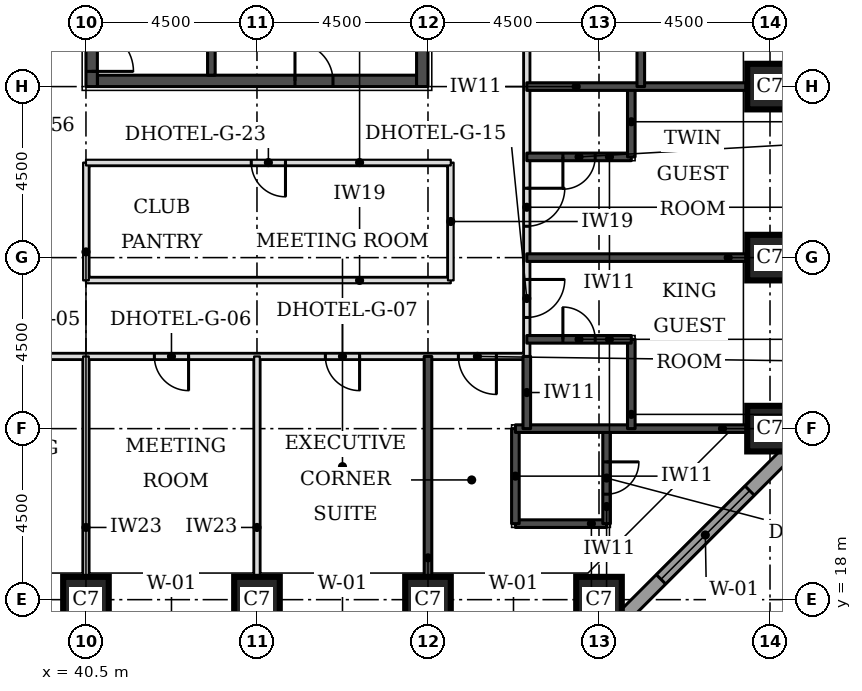
"""IFC4 building model, lengths in metres.
Left out: names, types, materials, properties, quantities, classifications, styles, units other than length and angle.
Written with IfcOpenShell. Run it as: python <this file> out.ifc"""

import sys

from ifc_helpers import new_model, si_unit, direction, frame, frame_2d, origin, origin_2d, place, context, subcontext, project, spatial, rectangle, extrude, element, fill, save


model = new_model("IFC4")
c1 = context("Model", 3, precision=1e-05, world=origin(), true_north=direction((0.0, 1.0)))
c2 = subcontext(c1, "Body", "Model", "MODEL_VIEW")
j1 = project(units=[si_unit("LENGTHUNIT", "METRE"), si_unit("PLANEANGLEUNIT", "RADIAN")], contexts=[c1])
p1 = place(None, origin())
s1 = spatial("IfcSite", under=j1, at=p1, CompositionType="ELEMENT")
p2 = place(p1, origin())
s2 = spatial("IfcBuilding", under=s1, at=p2, CompositionType="ELEMENT")
p3 = place(p2, frame((0.0, 0.0, 66.0)))
s3 = spatial("IfcBuildingStorey", under=s2, at=p3, CompositionType="ELEMENT", Elevation=66.0)
for number, where, z_axis, x_axis in (
    (1, (40.5, 18.0, 0.0), (0.0, 0.0, 1.0), (1.0, 0.0, 0.0)),
    (2, (45.0, 18.0, 0.0), (0.0, 0.0, 1.0), (1.0, 0.0, 0.0)),
    (3, (49.5, 18.0, 0.0), (0.0, 0.0, 1.0), (1.0, 0.0, 0.0)),
    (4, (54.0, 18.0, 0.0), (0.0, 0.0, 1.0), (1.0, 0.0, 0.0)),
    (5, (58.5, 22.5, 0.0), (0.0, 0.0, 1.0), (1.0, 0.0, 0.0)),
    (6, (58.5, 27.0, 0.0), (0.0, 0.0, 1.0), (1.0, 0.0, 0.0)),
    (7, (58.5, 31.5, 0.0), (0.0, 0.0, 1.0), (1.0, 0.0, 0.0)),
):
    element("IfcColumn", number, at=place(p3, frame(where, z_axis=z_axis, x_axis=x_axis)), inside=s3, PredefinedType="COLUMN", context=c2, shape_type="SweptSolid", body=[
        extrude(rectangle(XDim=1.2, YDim=1.2, at=origin_2d()), origin(), (0.0, 0.0, 1.0), 3.3),
    ])
p4 = place(p3, frame((40.8, 31.65, 0.0), z_axis=(0.0, 0.0, 1.0), x_axis=(1.0, 0.0, 0.0)))
e8 = element("IfcWall", 8, at=p4, inside=s3, PredefinedType="SHEAR", context=c2, shape_type="SweptSolid", body=[
    extrude(rectangle(XDim=8.4, YDim=0.3, at=frame_2d((4.2, 0.0))), origin(), (0.0, 0.0, 1.0), 3.3),
])
p5 = place(p4, frame((5.2, 0.0, 0.0)))
e9 = element("IfcOpeningElement", 9, at=p5, cuts=e8, PredefinedType="OPENING", context=c2, shape_type="SweptSolid", body=[
    extrude(rectangle(XDim=1.0, YDim=2.1, at=frame_2d((0.5, 1.05))), frame((0.0, 0.16, 0.0), z_axis=(0.0, -1.0, 0.0), x_axis=(1.0, 0.0, 0.0)), (0.0, 0.0, 1.0), 0.32),
])
p6 = place(p3, frame((40.65, 31.5, 0.0), z_axis=(0.0, 0.0, 1.0), x_axis=(0.0, 1.0, 0.0)))
e10 = element("IfcWall", 10, at=p6, inside=s3, PredefinedType="SHEAR", context=c2, shape_type="SweptSolid", body=[
    extrude(rectangle(XDim=9.0, YDim=0.3, at=frame_2d((4.5, 0.0))), origin(), (0.0, 0.0, 1.0), 3.3),
])
p7 = place(p6, frame((0.4, 0.0, 0.0)))
e11 = element("IfcOpeningElement", 11, at=p7, cuts=e10, PredefinedType="OPENING", context=c2, shape_type="SweptSolid", body=[
    extrude(rectangle(XDim=1.1, YDim=2.1, at=frame_2d((0.55, 1.05))), frame((0.0, 0.16, 0.0), z_axis=(0.0, -1.0, 0.0), x_axis=(1.0, 0.0, 0.0)), (0.0, 0.0, 1.0), 0.32),
])
p8 = place(p3, frame((49.35, 31.5, 0.0), z_axis=(0.0, 0.0, 1.0), x_axis=(0.0, 1.0, 0.0)))
e12 = element("IfcWall", 12, at=p8, inside=s3, PredefinedType="SHEAR", context=c2, shape_type="SweptSolid", body=[
    extrude(rectangle(XDim=9.0, YDim=0.3, at=frame_2d((4.5, 0.0))), origin(), (0.0, 0.0, 1.0), 3.3),
])
p9 = place(p3, frame((54.27, 17.174, 0.0), z_axis=(0.0, 0.0, 1.0), x_axis=(0.707106781187, 0.707106781187, 0.0)))
e13 = element("IfcWall", 13, at=p9, inside=s3, PredefinedType="STANDARD", context=c2, shape_type="SweptSolid", body=[
    extrude(rectangle(XDim=7.151, YDim=0.35, at=frame_2d((3.576, 0.0))), origin(), (0.0, 0.0, 1.0), 3.055),
])
p10 = place(p9, frame((1.926, 0.0, 0.8)))
e14 = element("IfcOpeningElement", 14, at=p10, cuts=e13, PredefinedType="OPENING", context=c2, shape_type="SweptSolid", body=[
    extrude(rectangle(XDim=3.3, YDim=1.5, at=frame_2d((1.65, 0.75))), frame((0.0, 0.185, 0.0), z_axis=(0.0, -1.0, 0.0), x_axis=(1.0, 0.0, 0.0)), (0.0, 0.0, 1.0), 0.37),
])
p11 = place(p3, frame((19.9, 24.4, 0.0), z_axis=(0.0, 0.0, 1.0), x_axis=(1.0, 0.0, 0.0)))
e15 = element("IfcWall", 15, at=p11, inside=s3, PredefinedType="PARTITIONING", context=c2, shape_type="SweptSolid", body=[
    extrude(rectangle(XDim=32.2, YDim=0.15, at=frame_2d((16.1, 0.0))), origin(), (0.0, 0.0, 1.0), 3.08),
])
p12 = place(p11, frame((4.4, 0.0, 0.0)))
e16 = element("IfcOpeningElement", 16, at=p12, cuts=e15, PredefinedType="OPENING", context=c2, shape_type="SweptSolid", body=[
    extrude(rectangle(XDim=0.9, YDim=2.1, at=frame_2d((0.45, 1.05))), frame((0.0, 0.085, 0.0), z_axis=(0.0, -1.0, 0.0), x_axis=(1.0, 0.0, 0.0)), (0.0, 0.0, 1.0), 0.17),
])
p13 = place(p11, frame((8.9, 0.0, 0.0)))
e17 = element("IfcOpeningElement", 17, at=p13, cuts=e15, PredefinedType="OPENING", context=c2, shape_type="SweptSolid", body=[
    extrude(rectangle(XDim=0.9, YDim=2.1, at=frame_2d((0.45, 1.05))), frame((0.0, 0.085, 0.0), z_axis=(0.0, -1.0, 0.0), x_axis=(1.0, 0.0, 0.0)), (0.0, 0.0, 1.0), 0.17),
])
p14 = place(p11, frame((13.4, 0.0, 0.0)))
e18 = element("IfcOpeningElement", 18, at=p14, cuts=e15, PredefinedType="OPENING", context=c2, shape_type="SweptSolid", body=[
    extrude(rectangle(XDim=0.9, YDim=2.1, at=frame_2d((0.45, 1.05))), frame((0.0, 0.085, 0.0), z_axis=(0.0, -1.0, 0.0), x_axis=(1.0, 0.0, 0.0)), (0.0, 0.0, 1.0), 0.17),
])
p15 = place(p11, frame((17.9, 0.0, 0.0)))
e19 = element("IfcOpeningElement", 19, at=p15, cuts=e15, PredefinedType="OPENING", context=c2, shape_type="SweptSolid", body=[
    extrude(rectangle(XDim=0.9, YDim=2.1, at=frame_2d((0.45, 1.05))), frame((0.0, 0.085, 0.0), z_axis=(0.0, -1.0, 0.0), x_axis=(1.0, 0.0, 0.0)), (0.0, 0.0, 1.0), 0.17),
])
p16 = place(p11, frame((22.4, 0.0, 0.0)))
e20 = element("IfcOpeningElement", 20, at=p16, cuts=e15, PredefinedType="OPENING", context=c2, shape_type="SweptSolid", body=[
    extrude(rectangle(XDim=0.9, YDim=2.1, at=frame_2d((0.45, 1.05))), frame((0.0, 0.085, 0.0), z_axis=(0.0, -1.0, 0.0), x_axis=(1.0, 0.0, 0.0)), (0.0, 0.0, 1.0), 0.17),
])
p17 = place(p11, frame((26.9, 0.0, 0.0)))
e21 = element("IfcOpeningElement", 21, at=p17, cuts=e15, PredefinedType="OPENING", context=c2, shape_type="SweptSolid", body=[
    extrude(rectangle(XDim=0.9, YDim=2.1, at=frame_2d((0.45, 1.05))), frame((0.0, 0.085, 0.0), z_axis=(0.0, -1.0, 0.0), x_axis=(1.0, 0.0, 0.0)), (0.0, 0.0, 1.0), 0.17),
])
p18 = place(p11, frame((0.8, 0.0, 0.0)))
e22 = element("IfcOpeningElement", 22, at=p18, cuts=e15, PredefinedType="OPENING", context=c2, shape_type="SweptSolid", body=[
    extrude(rectangle(XDim=1.0, YDim=2.1, at=frame_2d((0.5, 1.05))), frame((0.0, 0.085, 0.0), z_axis=(0.0, -1.0, 0.0), x_axis=(1.0, 0.0, 0.0)), (0.0, 0.0, 1.0), 0.17),
])
p19 = place(p11, frame((30.4, 0.0, 0.0)))
e23 = element("IfcOpeningElement", 23, at=p19, cuts=e15, PredefinedType="OPENING", context=c2, shape_type="SweptSolid", body=[
    extrude(rectangle(XDim=1.0, YDim=2.1, at=frame_2d((0.5, 1.05))), frame((0.0, 0.085, 0.0), z_axis=(0.0, -1.0, 0.0), x_axis=(1.0, 0.0, 0.0)), (0.0, 0.0, 1.0), 0.17),
])
p20 = place(p3, frame((52.1, 24.4, 0.0), z_axis=(0.0, 0.0, 1.0), x_axis=(0.0, 1.0, 0.0)))
e24 = element("IfcWall", 24, at=p20, inside=s3, PredefinedType="PARTITIONING", context=c2, shape_type="SweptSolid", body=[
    extrude(rectangle(XDim=23.1, YDim=0.15, at=frame_2d((11.55, 0.0))), origin(), (0.0, 0.0, 1.0), 3.08),
])
p21 = place(p20, frame((1.025, 0.0, 0.0)))
e25 = element("IfcOpeningElement", 25, at=p21, cuts=e24, PredefinedType="OPENING", context=c2, shape_type="SweptSolid", body=[
    extrude(rectangle(XDim=1.0, YDim=2.1, at=frame_2d((0.5, 1.05))), frame((0.0, 0.085, 0.0), z_axis=(0.0, -1.0, 0.0), x_axis=(1.0, 0.0, 0.0)), (0.0, 0.0, 1.0), 0.17),
])
p22 = place(p20, frame((3.425, 0.0, 0.0)))
e26 = element("IfcOpeningElement", 26, at=p22, cuts=e24, PredefinedType="OPENING", context=c2, shape_type="SweptSolid", body=[
    extrude(rectangle(XDim=1.0, YDim=2.1, at=frame_2d((0.5, 1.05))), frame((0.0, 0.085, 0.0), z_axis=(0.0, -1.0, 0.0), x_axis=(1.0, 0.0, 0.0)), (0.0, 0.0, 1.0), 0.17),
])
p23 = place(p20, frame((10.025, 0.0, 0.0)))
e27 = element("IfcOpeningElement", 27, at=p23, cuts=e24, PredefinedType="OPENING", context=c2, shape_type="SweptSolid", body=[
    extrude(rectangle(XDim=1.0, YDim=2.1, at=frame_2d((0.5, 1.05))), frame((0.0, 0.085, 0.0), z_axis=(0.0, -1.0, 0.0), x_axis=(1.0, 0.0, 0.0)), (0.0, 0.0, 1.0), 0.17),
])
p24 = place(p20, frame((12.425, 0.0, 0.0)))
e28 = element("IfcOpeningElement", 28, at=p24, cuts=e24, PredefinedType="OPENING", context=c2, shape_type="SweptSolid", body=[
    extrude(rectangle(XDim=1.0, YDim=2.1, at=frame_2d((0.5, 1.05))), frame((0.0, 0.085, 0.0), z_axis=(0.0, -1.0, 0.0), x_axis=(1.0, 0.0, 0.0)), (0.0, 0.0, 1.0), 0.17),
])
p25 = place(p20, frame((19.15, 0.0, 0.0)))
e29 = element("IfcOpeningElement", 29, at=p25, cuts=e24, PredefinedType="OPENING", context=c2, shape_type="SweptSolid", body=[
    extrude(rectangle(XDim=0.9, YDim=2.1, at=frame_2d((0.45, 1.05))), frame((0.0, 0.085, 0.0), z_axis=(0.0, -1.0, 0.0), x_axis=(1.0, 0.0, 0.0)), (0.0, 0.0, 1.0), 0.17),
])
p26 = place(p3, frame((40.5, 26.4, 0.0), z_axis=(0.0, 0.0, 1.0), x_axis=(1.0, 0.0, 0.0)))
e30 = element("IfcWall", 30, at=p26, inside=s3, PredefinedType="PARTITIONING", context=c2, shape_type="SweptSolid", body=[
    extrude(rectangle(XDim=9.6, YDim=0.15, at=frame_2d((4.8, 0.0))), origin(), (0.0, 0.0, 1.0), 3.08),
])
for number, where, z_axis, x_axis in (
    (31, (40.5, 26.4, 0.0), (0.0, 0.0, 1.0), (0.0, 1.0, 0.0)),
    (32, (50.1, 26.4, 0.0), (0.0, 0.0, 1.0), (0.0, 1.0, 0.0)),
):
    element("IfcWall", number, at=place(p3, frame(where, z_axis=z_axis, x_axis=x_axis)), inside=s3, PredefinedType="PARTITIONING", context=c2, shape_type="SweptSolid", body=[
        extrude(rectangle(XDim=3.1, YDim=0.15, at=frame_2d((1.55, 0.0))), origin(), (0.0, 0.0, 1.0), 3.08),
    ])
p27 = place(p3, frame((40.5, 29.5, 0.0), z_axis=(0.0, 0.0, 1.0), x_axis=(1.0, 0.0, 0.0)))
e33 = element("IfcWall", 33, at=p27, inside=s3, PredefinedType="PARTITIONING", context=c2, shape_type="SweptSolid", body=[
    extrude(rectangle(XDim=9.6, YDim=0.15, at=frame_2d((4.8, 0.0))), origin(), (0.0, 0.0, 1.0), 3.08),
])
p28 = place(p27, frame((4.35, 0.0, 0.0)))
e34 = element("IfcOpeningElement", 34, at=p28, cuts=e33, PredefinedType="OPENING", context=c2, shape_type="SweptSolid", body=[
    extrude(rectangle(XDim=0.9, YDim=2.1, at=frame_2d((0.45, 1.05))), frame((0.0, 0.085, 0.0), z_axis=(0.0, -1.0, 0.0), x_axis=(1.0, 0.0, 0.0)), (0.0, 0.0, 1.0), 0.17),
])
p29 = place(p3, frame((49.5, 18.6, 0.0), z_axis=(0.0, 0.0, 1.0), x_axis=(0.0, 1.0, 0.0)))
e35 = element("IfcWall", 35, at=p29, inside=s3, PredefinedType="SOLIDWALL", context=c2, shape_type="SweptSolid", body=[
    extrude(rectangle(XDim=5.8, YDim=0.2, at=frame_2d((2.9, 0.0))), origin(), (0.0, 0.0, 1.0), 3.08),
])
p30 = place(p3, frame((51.8, 20.0, 0.0), z_axis=(0.0, 0.0, 1.0), x_axis=(1.0, 0.0, 0.0)))
e36 = element("IfcWall", 36, at=p30, inside=s3, PredefinedType="SOLIDWALL", context=c2, shape_type="SweptSolid", body=[
    extrude(rectangle(XDim=2.4, YDim=0.2, at=frame_2d((1.2, 0.0))), origin(), (0.0, 0.0, 1.0), 3.08),
])
p31 = place(p3, frame((51.8, 20.0, 0.0), z_axis=(0.0, 0.0, 1.0), x_axis=(0.0, 1.0, 0.0)))
e37 = element("IfcWall", 37, at=p31, inside=s3, PredefinedType="SOLIDWALL", context=c2, shape_type="SweptSolid", body=[
    extrude(rectangle(XDim=2.5, YDim=0.2, at=frame_2d((1.25, 0.0))), origin(), (0.0, 0.0, 1.0), 3.08),
])
p32 = place(p3, frame((54.2, 20.0, 0.0), z_axis=(0.0, 0.0, 1.0), x_axis=(0.0, 1.0, 0.0)))
e38 = element("IfcWall", 38, at=p32, inside=s3, PredefinedType="SOLIDWALL", context=c2, shape_type="SweptSolid", body=[
    extrude(rectangle(XDim=2.5, YDim=0.2, at=frame_2d((1.25, 0.0))), origin(), (0.0, 0.0, 1.0), 3.08),
])
p33 = place(p32, frame((0.775, 0.0, 0.0)))
e39 = element("IfcOpeningElement", 39, at=p33, cuts=e38, PredefinedType="OPENING", context=c2, shape_type="SweptSolid", body=[
    extrude(rectangle(XDim=0.85, YDim=2.1, at=frame_2d((0.425, 1.05))), frame((0.0, 0.11, 0.0), z_axis=(0.0, -1.0, 0.0), x_axis=(1.0, 0.0, 0.0)), (0.0, 0.0, 1.0), 0.22),
])
p34 = place(p3, frame((51.8, 22.5, 0.0), z_axis=(0.0, 0.0, 1.0), x_axis=(1.0, 0.0, 0.0)))
e40 = element("IfcWall", 40, at=p34, inside=s3, PredefinedType="SOLIDWALL", context=c2, shape_type="SweptSolid", body=[
    extrude(rectangle(XDim=6.1, YDim=0.2, at=frame_2d((3.05, 0.0))), origin(), (0.0, 0.0, 1.0), 3.08),
])
p35 = place(p3, frame((52.1, 22.5, 0.0), z_axis=(0.0, 0.0, 1.0), x_axis=(0.0, 1.0, 0.0)))
e41 = element("IfcWall", 41, at=p35, inside=s3, PredefinedType="SOLIDWALL", context=c2, shape_type="SweptSolid", body=[
    extrude(rectangle(XDim=1.9, YDim=0.2, at=frame_2d((0.95, 0.0))), origin(), (0.0, 0.0, 1.0), 3.08),
])
p36 = place(p3, frame((54.85, 22.5, 0.0), z_axis=(0.0, 0.0, 1.0), x_axis=(0.0, 1.0, 0.0)))
e42 = element("IfcWall", 42, at=p36, inside=s3, PredefinedType="SOLIDWALL", context=c2, shape_type="SweptSolid", body=[
    extrude(rectangle(XDim=2.35, YDim=0.2, at=frame_2d((1.175, 0.0))), origin(), (0.0, 0.0, 1.0), 3.08),
])
p37 = place(p3, frame((52.1, 24.85, 0.0), z_axis=(0.0, 0.0, 1.0), x_axis=(1.0, 0.0, 0.0)))
e43 = element("IfcWall", 43, at=p37, inside=s3, PredefinedType="SOLIDWALL", context=c2, shape_type="SweptSolid", body=[
    extrude(rectangle(XDim=2.75, YDim=0.2, at=frame_2d((1.375, 0.0))), origin(), (0.0, 0.0, 1.0), 3.08),
])
p38 = place(p37, frame((0.95, 0.0, 0.0)))
e44 = element("IfcOpeningElement", 44, at=p38, cuts=e43, PredefinedType="OPENING", context=c2, shape_type="SweptSolid", body=[
    extrude(rectangle(XDim=0.85, YDim=2.1, at=frame_2d((0.425, 1.05))), frame((0.0, 0.11, 0.0), z_axis=(0.0, -1.0, 0.0), x_axis=(1.0, 0.0, 0.0)), (0.0, 0.0, 1.0), 0.22),
])
p39 = place(p3, frame((52.1, 27.0, 0.0), z_axis=(0.0, 0.0, 1.0), x_axis=(1.0, 0.0, 0.0)))
e45 = element("IfcWall", 45, at=p39, inside=s3, PredefinedType="SOLIDWALL", context=c2, shape_type="SweptSolid", body=[
    extrude(rectangle(XDim=5.8, YDim=0.2, at=frame_2d((2.9, 0.0))), origin(), (0.0, 0.0, 1.0), 3.08),
])
p40 = place(p3, frame((52.1, 29.65, 0.0), z_axis=(0.0, 0.0, 1.0), x_axis=(1.0, 0.0, 0.0)))
e46 = element("IfcWall", 46, at=p40, inside=s3, PredefinedType="SOLIDWALL", context=c2, shape_type="SweptSolid", body=[
    extrude(rectangle(XDim=2.75, YDim=0.2, at=frame_2d((1.375, 0.0))), origin(), (0.0, 0.0, 1.0), 3.08),
])
p41 = place(p40, frame((0.95, 0.0, 0.0)))
e47 = element("IfcOpeningElement", 47, at=p41, cuts=e46, PredefinedType="OPENING", context=c2, shape_type="SweptSolid", body=[
    extrude(rectangle(XDim=0.85, YDim=2.1, at=frame_2d((0.425, 1.05))), frame((0.0, 0.11, 0.0), z_axis=(0.0, -1.0, 0.0), x_axis=(1.0, 0.0, 0.0)), (0.0, 0.0, 1.0), 0.22),
])
p42 = place(p3, frame((54.85, 29.65, 0.0), z_axis=(0.0, 0.0, 1.0), x_axis=(0.0, 1.0, 0.0)))
e48 = element("IfcWall", 48, at=p42, inside=s3, PredefinedType="SOLIDWALL", context=c2, shape_type="SweptSolid", body=[
    extrude(rectangle(XDim=1.85, YDim=0.2, at=frame_2d((0.925, 0.0))), origin(), (0.0, 0.0, 1.0), 3.08),
])
p43 = place(p3, frame((52.1, 31.5, 0.0), z_axis=(0.0, 0.0, 1.0), x_axis=(1.0, 0.0, 0.0)))
e49 = element("IfcWall", 49, at=p43, inside=s3, PredefinedType="SOLIDWALL", context=c2, shape_type="SweptSolid", body=[
    extrude(rectangle(XDim=5.8, YDim=0.2, at=frame_2d((2.9, 0.0))), origin(), (0.0, 0.0, 1.0), 3.08),
])
p44 = place(p3, frame((55.1, 31.5, 0.0), z_axis=(0.0, 0.0, 1.0), x_axis=(0.0, 1.0, 0.0)))
e50 = element("IfcWall", 50, at=p44, inside=s3, PredefinedType="SOLIDWALL", context=c2, shape_type="SweptSolid", body=[
    extrude(rectangle(XDim=2.35, YDim=0.2, at=frame_2d((1.175, 0.0))), origin(), (0.0, 0.0, 1.0), 3.08),
])
for number, where, z_axis, x_axis in (
    (51, (40.5, 18.6, 0.0), (0.0, 0.0, 1.0), (0.0, 1.0, 0.0)),
    (52, (45.0, 18.6, 0.0), (0.0, 0.0, 1.0), (0.0, 1.0, 0.0)),
):
    element("IfcWall", number, at=place(p3, frame(where, z_axis=z_axis, x_axis=x_axis)), inside=s3, PredefinedType="PARTITIONING", context=c2, shape_type="SweptSolid", body=[
        extrude(rectangle(XDim=5.8, YDim=0.15, at=frame_2d((2.9, 0.0))), origin(), (0.0, 0.0, 1.0), 3.08),
    ])
p45 = place(p3, frame((43.8, 31.8, 0.0), z_axis=(0.0, 0.0, 1.0), x_axis=(0.0, 1.0, 0.0)))
e53 = element("IfcWall", 53, at=p45, inside=s3, PredefinedType="SOLIDWALL", context=c2, shape_type="SweptSolid", body=[
    extrude(rectangle(XDim=5.7, YDim=0.2, at=frame_2d((2.85, 0.0))), origin(), (0.0, 0.0, 1.0), 3.08),
])
p46 = place(p10, origin())
e54 = element("IfcWindow", 54, at=p46, inside=s3, PartitioningType="SINGLE_PANEL", PredefinedType="WINDOW", context=c2, shape_type="SweptSolid", body=[
    extrude(rectangle(XDim=3.3, YDim=1.5, at=frame_2d((1.65, 0.75))), frame((0.0, 0.085, 0.0), z_axis=(0.0, -1.0, 0.0), x_axis=(1.0, 0.0, 0.0)), (0.0, 0.0, 1.0), 0.06),
])
fill(e14, e54)
p47 = place(p16, frame((0.9, 0.0, 0.0), z_axis=(0.0, 0.0, 1.0), x_axis=(-1.0, 0.0, 0.0)))
e55 = element("IfcDoor", 55, at=p47, inside=s3, OperationType="SINGLE_SWING_LEFT", PredefinedType="DOOR", context=c2, shape_type="SweptSolid", body=[
    extrude(rectangle(XDim=0.9, YDim=2.1, at=frame_2d((0.45, 1.05))), frame((0.0, 0.025, 0.0), z_axis=(0.0, -1.0, 0.0), x_axis=(1.0, 0.0, 0.0)), (0.0, 0.0, 1.0), 0.05),
])
fill(e20, e55)
p48 = place(p17, frame((0.9, 0.0, 0.0), z_axis=(0.0, 0.0, 1.0), x_axis=(-1.0, 0.0, 0.0)))
e56 = element("IfcDoor", 56, at=p48, inside=s3, OperationType="SINGLE_SWING_LEFT", PredefinedType="DOOR", context=c2, shape_type="SweptSolid", body=[
    extrude(rectangle(XDim=0.9, YDim=2.1, at=frame_2d((0.45, 1.05))), frame((0.0, 0.025, 0.0), z_axis=(0.0, -1.0, 0.0), x_axis=(1.0, 0.0, 0.0)), (0.0, 0.0, 1.0), 0.05),
])
fill(e21, e56)
p49 = place(p21, frame((1.0, 0.0, 0.0), z_axis=(0.0, 0.0, 1.0), x_axis=(-1.0, 0.0, 0.0)))
e57 = element("IfcDoor", 57, at=p49, inside=s3, OperationType="SINGLE_SWING_LEFT", PredefinedType="DOOR", context=c2, shape_type="SweptSolid", body=[
    extrude(rectangle(XDim=1.0, YDim=2.1, at=frame_2d((0.5, 1.05))), frame((0.0, 0.025, 0.0), z_axis=(0.0, -1.0, 0.0), x_axis=(1.0, 0.0, 0.0)), (0.0, 0.0, 1.0), 0.05),
])
fill(e25, e57)
p50 = place(p38, origin())
e58 = element("IfcDoor", 58, at=p50, inside=s3, OperationType="SINGLE_SWING_LEFT", PredefinedType="DOOR", context=c2, shape_type="SweptSolid", body=[
    extrude(rectangle(XDim=0.85, YDim=2.1, at=frame_2d((0.425, 1.05))), frame((0.0, 0.025, 0.0), z_axis=(0.0, -1.0, 0.0), x_axis=(1.0, 0.0, 0.0)), (0.0, 0.0, 1.0), 0.05),
])
fill(e44, e58)
p51 = place(p22, frame((1.0, 0.0, 0.0), z_axis=(0.0, 0.0, 1.0), x_axis=(-1.0, 0.0, 0.0)))
e59 = element("IfcDoor", 59, at=p51, inside=s3, OperationType="SINGLE_SWING_LEFT", PredefinedType="DOOR", context=c2, shape_type="SweptSolid", body=[
    extrude(rectangle(XDim=1.0, YDim=2.1, at=frame_2d((0.5, 1.05))), frame((0.0, 0.025, 0.0), z_axis=(0.0, -1.0, 0.0), x_axis=(1.0, 0.0, 0.0)), (0.0, 0.0, 1.0), 0.05),
])
fill(e26, e59)
p52 = place(p41, frame((0.85, 0.0, 0.0), z_axis=(0.0, 0.0, 1.0), x_axis=(-1.0, 0.0, 0.0)))
e60 = element("IfcDoor", 60, at=p52, inside=s3, OperationType="SINGLE_SWING_RIGHT", PredefinedType="DOOR", context=c2, shape_type="SweptSolid", body=[
    extrude(rectangle(XDim=0.85, YDim=2.1, at=frame_2d((0.425, 1.05))), frame((0.0, 0.025, 0.0), z_axis=(0.0, -1.0, 0.0), x_axis=(1.0, 0.0, 0.0)), (0.0, 0.0, 1.0), 0.05),
])
fill(e47, e60)
p53 = place(p19, frame((1.0, 0.0, 0.0), z_axis=(0.0, 0.0, 1.0), x_axis=(-1.0, 0.0, 0.0)))
e61 = element("IfcDoor", 61, at=p53, inside=s3, OperationType="SINGLE_SWING_LEFT", PredefinedType="DOOR", context=c2, shape_type="SweptSolid", body=[
    extrude(rectangle(XDim=1.0, YDim=2.1, at=frame_2d((0.5, 1.05))), frame((0.0, 0.025, 0.0), z_axis=(0.0, -1.0, 0.0), x_axis=(1.0, 0.0, 0.0)), (0.0, 0.0, 1.0), 0.05),
])
fill(e23, e61)
p54 = place(p33, frame((0.85, 0.0, 0.0), z_axis=(0.0, 0.0, 1.0), x_axis=(-1.0, 0.0, 0.0)))
e62 = element("IfcDoor", 62, at=p54, inside=s3, OperationType="SINGLE_SWING_LEFT", PredefinedType="DOOR", context=c2, shape_type="SweptSolid", body=[
    extrude(rectangle(XDim=0.85, YDim=2.1, at=frame_2d((0.425, 1.05))), frame((0.0, 0.025, 0.0), z_axis=(0.0, -1.0, 0.0), x_axis=(1.0, 0.0, 0.0)), (0.0, 0.0, 1.0), 0.05),
])
fill(e39, e62)
p55 = place(p28, frame((0.9, 0.0, 0.0), z_axis=(0.0, 0.0, 1.0), x_axis=(-1.0, 0.0, 0.0)))
e63 = element("IfcDoor", 63, at=p55, inside=s3, OperationType="SINGLE_SWING_LEFT", PredefinedType="DOOR", context=c2, shape_type="SweptSolid", body=[
    extrude(rectangle(XDim=0.9, YDim=2.1, at=frame_2d((0.45, 1.05))), frame((0.0, 0.025, 0.0), z_axis=(0.0, -1.0, 0.0), x_axis=(1.0, 0.0, 0.0)), (0.0, 0.0, 1.0), 0.05),
])
fill(e34, e63)
p56 = place(p7, frame((1.1, 0.0, 0.0), z_axis=(0.0, 0.0, 1.0), x_axis=(-1.0, 0.0, 0.0)))
e64 = element("IfcDoor", 64, at=p56, inside=s3, OperationType="SINGLE_SWING_RIGHT", PredefinedType="DOOR", context=c2, shape_type="SweptSolid", body=[
    extrude(rectangle(XDim=1.1, YDim=2.1, at=frame_2d((0.55, 1.05))), frame((0.0, 0.025, 0.0), z_axis=(0.0, -1.0, 0.0), x_axis=(1.0, 0.0, 0.0)), (0.0, 0.0, 1.0), 0.05),
])
fill(e11, e64)
p57 = place(p5, origin())
e65 = element("IfcDoor", 65, at=p57, inside=s3, OperationType="SINGLE_SWING_LEFT", PredefinedType="DOOR", context=c2, shape_type="SweptSolid", body=[
    extrude(rectangle(XDim=1.0, YDim=2.1, at=frame_2d((0.5, 1.05))), frame((0.0, 0.025, 0.0), z_axis=(0.0, -1.0, 0.0), x_axis=(1.0, 0.0, 0.0)), (0.0, 0.0, 1.0), 0.05),
])
fill(e9, e65)
save(model, sys.argv[1])
